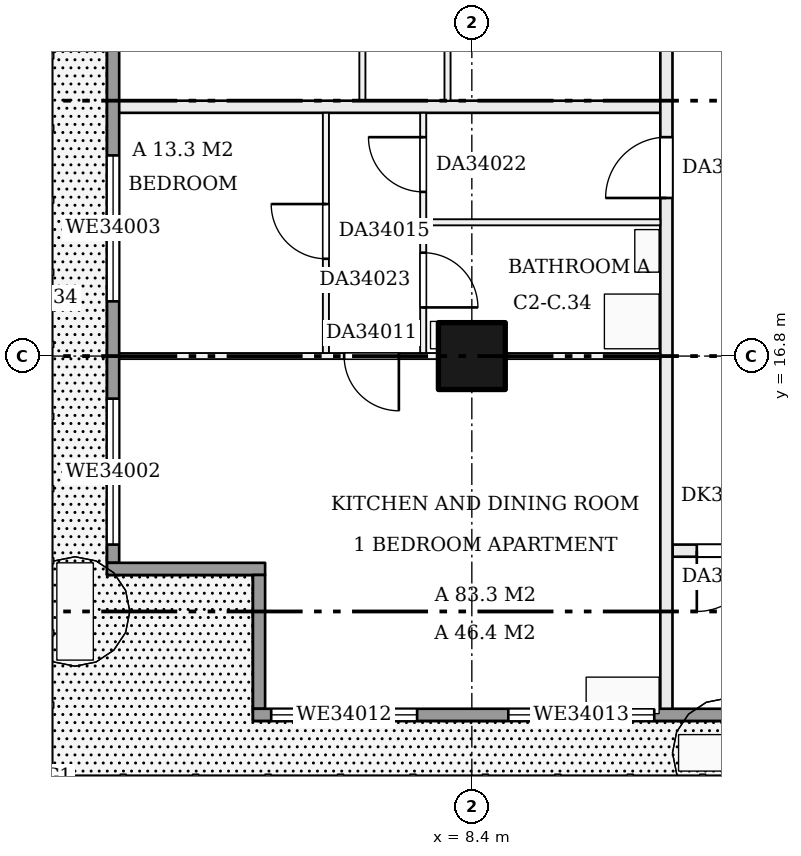
"""IFC4 building model, lengths in metres.
Left out: names, types, materials, properties, quantities, classifications, styles, units other than length and angle.
Written with IfcOpenShell. Run it as: python <this file> out.ifc"""

import sys

from ifc_helpers import new_model, si_unit, direction, frame, frame_2d, origin, origin_2d, place, context, subcontext, project, spatial, rectangle, extrude, element, fill, save


model = new_model("IFC4")
c1 = context("Model", 3, precision=1e-05, world=origin(), true_north=direction((0.0, 1.0)))
c2 = subcontext(c1, "Body", "Model", "MODEL_VIEW")
j1 = project(units=[si_unit("LENGTHUNIT", "METRE"), si_unit("PLANEANGLEUNIT", "RADIAN")], contexts=[c1])
p1 = place(None, origin())
s1 = spatial("IfcSite", under=j1, at=p1, CompositionType="ELEMENT")
p2 = place(p1, origin())
s2 = spatial("IfcBuilding", under=s1, at=p2, CompositionType="ELEMENT")
p3 = place(p2, frame((0.0, 0.0, 133.7)))
s3 = spatial("IfcBuildingStorey", under=s2, at=p3, CompositionType="ELEMENT", Elevation=133.7)
p4 = place(p3, frame((8.4, 16.8, 0.0), z_axis=(0.0, 0.0, 1.0), x_axis=(1.0, 0.0, 0.0)))
e1 = element("IfcColumn", 1, at=p4, inside=s3, PredefinedType="COLUMN", context=c2, shape_type="SweptSolid", body=[
    extrude(rectangle(XDim=1.1, YDim=1.1, at=origin_2d()), origin(), (0.0, 0.0, 1.0), 3.22),
])
p5 = place(p3, frame((11.7, 13.6, 0.0), z_axis=(0.0, 0.0, 1.0), x_axis=(1.0, 0.0, 0.0)))
e2 = element("IfcWall", 2, at=p5, inside=s3, PredefinedType="PARTITIONING", context=c2, shape_type="SweptSolid", body=[
    extrude(rectangle(XDim=1.8, YDim=0.2, at=frame_2d((0.9, 0.0))), origin(), (0.0, 0.0, 1.0), 3.22),
])
p6 = place(p5, frame((0.4, 0.0, 0.0)))
e3 = element("IfcOpeningElement", 3, at=p6, cuts=e2, PredefinedType="OPENING", context=c2, shape_type="SweptSolid", body=[
    extrude(rectangle(XDim=1.0, YDim=2.1, at=frame_2d((0.5, 1.05))), frame((0.0, 0.11, 0.0), z_axis=(0.0, -1.0, 0.0), x_axis=(1.0, 0.0, 0.0)), (0.0, 0.0, 1.0), 0.22),
])
p7 = place(p3, frame((2.5, 16.8, 0.0), z_axis=(0.0, 0.0, 1.0), x_axis=(1.0, 0.0, 0.0)))
e4 = element("IfcWall", 4, at=p7, inside=s3, PredefinedType="PARTITIONING", context=c2, shape_type="SweptSolid", body=[
    extrude(rectangle(XDim=9.0, YDim=0.1, at=frame_2d((4.5, 0.0))), origin(), (0.0, 0.0, 1.0), 3.22),
])
p8 = place(p7, frame((3.8, 0.0, 0.0)))
e5 = element("IfcOpeningElement", 5, at=p8, cuts=e4, PredefinedType="OPENING", context=c2, shape_type="SweptSolid", body=[
    extrude(rectangle(XDim=0.9, YDim=2.1, at=frame_2d((0.45, 1.05))), frame((0.0, 0.06, 0.0), z_axis=(0.0, -1.0, 0.0), x_axis=(1.0, 0.0, 0.0)), (0.0, 0.0, 1.0), 0.12),
])
p9 = place(p3, frame((7.65, 19.0, 0.0), z_axis=(0.0, 0.0, 1.0), x_axis=(1.0, 0.0, 0.0)))
e6 = element("IfcWall", 6, at=p9, inside=s3, PredefinedType="PARTITIONING", context=c2, shape_type="SweptSolid", body=[
    extrude(rectangle(XDim=3.85, YDim=0.1, at=frame_2d((1.925, 0.0))), origin(), (0.0, 0.0, 1.0), 3.22),
])
p10 = place(p3, frame((2.5, 20.9, 0.0), z_axis=(0.0, 0.0, 1.0), x_axis=(1.0, 0.0, 0.0)))
e7 = element("IfcWall", 7, at=p10, inside=s3, PredefinedType="PARTITIONING", context=c2, shape_type="SweptSolid", body=[
    extrude(rectangle(XDim=9.0, YDim=0.2, at=frame_2d((4.5, 0.0))), origin(), (0.0, 0.0, 1.0), 3.22),
])
p11 = place(p3, frame((6.0, 16.85, 0.0), z_axis=(0.0, 0.0, 1.0), x_axis=(0.0, 1.0, 0.0)))
e8 = element("IfcWall", 8, at=p11, inside=s3, PredefinedType="PARTITIONING", context=c2, shape_type="SweptSolid", body=[
    extrude(rectangle(XDim=3.95, YDim=0.1, at=frame_2d((1.975, 0.0))), origin(), (0.0, 0.0, 1.0), 3.22),
])
p12 = place(p11, frame((1.55, 0.0, 0.0)))
e9 = element("IfcOpeningElement", 9, at=p12, cuts=e8, PredefinedType="OPENING", context=c2, shape_type="SweptSolid", body=[
    extrude(rectangle(XDim=0.9, YDim=2.1, at=frame_2d((0.45, 1.05))), frame((0.0, 0.06, 0.0), z_axis=(0.0, -1.0, 0.0), x_axis=(1.0, 0.0, 0.0)), (0.0, 0.0, 1.0), 0.12),
])
p13 = place(p3, frame((6.6, 21.0, 0.0), z_axis=(0.0, 0.0, 1.0), x_axis=(0.0, 1.0, 0.0)))
e10 = element("IfcWall", 10, at=p13, inside=s3, PredefinedType="PARTITIONING", context=c2, shape_type="SweptSolid", body=[
    extrude(rectangle(XDim=20.9, YDim=0.1, at=frame_2d((10.45, 0.0))), origin(), (0.0, 0.0, 1.0), 3.22),
])
p14 = place(p13, frame((5.8, 0.0, 0.0)))
e11 = element("IfcOpeningElement", 11, at=p14, cuts=e10, PredefinedType="OPENING", context=c2, shape_type="SweptSolid", body=[
    extrude(rectangle(XDim=0.9, YDim=2.1, at=frame_2d((0.45, 1.05))), frame((0.0, 0.06, 0.0), z_axis=(0.0, -1.0, 0.0), x_axis=(1.0, 0.0, 0.0)), (0.0, 0.0, 1.0), 0.12),
])
p15 = place(p13, frame((14.2, 0.0, 0.0)))
e12 = element("IfcOpeningElement", 12, at=p15, cuts=e10, PredefinedType="OPENING", context=c2, shape_type="SweptSolid", body=[
    extrude(rectangle(XDim=0.9, YDim=2.1, at=frame_2d((0.45, 1.05))), frame((0.0, 0.06, 0.0), z_axis=(0.0, -1.0, 0.0), x_axis=(1.0, 0.0, 0.0)), (0.0, 0.0, 1.0), 0.12),
])
p16 = place(p13, frame((18.4, 0.0, 0.0)))
e13 = element("IfcOpeningElement", 13, at=p16, cuts=e10, PredefinedType="OPENING", context=c2, shape_type="SweptSolid", body=[
    extrude(rectangle(XDim=0.9, YDim=2.1, at=frame_2d((0.45, 1.05))), frame((0.0, 0.06, 0.0), z_axis=(0.0, -1.0, 0.0), x_axis=(1.0, 0.0, 0.0)), (0.0, 0.0, 1.0), 0.12),
])
p17 = place(p3, frame((7.6, 16.85, 0.0), z_axis=(0.0, 0.0, 1.0), x_axis=(0.0, 1.0, 0.0)))
e14 = element("IfcWall", 14, at=p17, inside=s3, PredefinedType="PARTITIONING", context=c2, shape_type="SweptSolid", body=[
    extrude(rectangle(XDim=3.95, YDim=0.1, at=frame_2d((1.975, 0.0))), origin(), (0.0, 0.0, 1.0), 3.22),
])
p18 = place(p17, frame((2.65, 0.0, 0.0)))
e15 = element("IfcOpeningElement", 15, at=p18, cuts=e14, PredefinedType="OPENING", context=c2, shape_type="SweptSolid", body=[
    extrude(rectangle(XDim=0.9, YDim=2.1, at=frame_2d((0.45, 1.05))), frame((0.0, 0.06, 0.0), z_axis=(0.0, -1.0, 0.0), x_axis=(1.0, 0.0, 0.0)), (0.0, 0.0, 1.0), 0.12),
])
p19 = place(p17, frame((0.75, 0.0, 0.0)))
e16 = element("IfcOpeningElement", 16, at=p19, cuts=e14, PredefinedType="OPENING", context=c2, shape_type="SweptSolid", body=[
    extrude(rectangle(XDim=0.9, YDim=2.1, at=frame_2d((0.45, 1.05))), frame((0.0, 0.06, 0.0), z_axis=(0.0, -1.0, 0.0), x_axis=(1.0, 0.0, 0.0)), (0.0, 0.0, 1.0), 0.12),
])
p20 = place(p3, frame((8.0, 21.0, 0.0), z_axis=(0.0, 0.0, 1.0), x_axis=(0.0, 1.0, 0.0)))
e17 = element("IfcWall", 17, at=p20, inside=s3, PredefinedType="PARTITIONING", context=c2, shape_type="SweptSolid", body=[
    extrude(rectangle(XDim=20.9, YDim=0.1, at=frame_2d((10.45, 0.0))), origin(), (0.0, 0.0, 1.0), 3.22),
])
p21 = place(p20, frame((1.1, 0.0, 0.0)))
e18 = element("IfcOpeningElement", 18, at=p21, cuts=e17, PredefinedType="OPENING", context=c2, shape_type="SweptSolid", body=[
    extrude(rectangle(XDim=0.9, YDim=2.1, at=frame_2d((0.45, 1.05))), frame((0.0, 0.06, 0.0), z_axis=(0.0, -1.0, 0.0), x_axis=(1.0, 0.0, 0.0)), (0.0, 0.0, 1.0), 0.12),
])
p22 = place(p20, frame((4.95, 0.0, 0.0)))
e19 = element("IfcOpeningElement", 19, at=p22, cuts=e17, PredefinedType="OPENING", context=c2, shape_type="SweptSolid", body=[
    extrude(rectangle(XDim=0.9, YDim=2.1, at=frame_2d((0.45, 1.05))), frame((0.0, 0.06, 0.0), z_axis=(0.0, -1.0, 0.0), x_axis=(1.0, 0.0, 0.0)), (0.0, 0.0, 1.0), 0.12),
])
p23 = place(p20, frame((8.7, 0.0, 0.0)))
e20 = element("IfcOpeningElement", 20, at=p23, cuts=e17, PredefinedType="OPENING", context=c2, shape_type="SweptSolid", body=[
    extrude(rectangle(XDim=0.9, YDim=2.1, at=frame_2d((0.45, 1.05))), frame((0.0, 0.06, 0.0), z_axis=(0.0, -1.0, 0.0), x_axis=(1.0, 0.0, 0.0)), (0.0, 0.0, 1.0), 0.12),
])
p24 = place(p20, frame((13.35, 0.0, 0.0)))
e21 = element("IfcOpeningElement", 21, at=p24, cuts=e17, PredefinedType="OPENING", context=c2, shape_type="SweptSolid", body=[
    extrude(rectangle(XDim=0.9, YDim=2.1, at=frame_2d((0.45, 1.05))), frame((0.0, 0.06, 0.0), z_axis=(0.0, -1.0, 0.0), x_axis=(1.0, 0.0, 0.0)), (0.0, 0.0, 1.0), 0.12),
])
p25 = place(p20, frame((15.5, 0.0, 0.0)))
e22 = element("IfcOpeningElement", 22, at=p25, cuts=e17, PredefinedType="OPENING", context=c2, shape_type="SweptSolid", body=[
    extrude(rectangle(XDim=0.9, YDim=2.1, at=frame_2d((0.45, 1.05))), frame((0.0, 0.06, 0.0), z_axis=(0.0, -1.0, 0.0), x_axis=(1.0, 0.0, 0.0)), (0.0, 0.0, 1.0), 0.12),
])
p26 = place(p20, frame((18.75, 0.0, 0.0)))
e23 = element("IfcOpeningElement", 23, at=p26, cuts=e17, PredefinedType="OPENING", context=c2, shape_type="SweptSolid", body=[
    extrude(rectangle(XDim=0.9, YDim=2.1, at=frame_2d((0.45, 1.05))), frame((0.0, 0.06, 0.0), z_axis=(0.0, -1.0, 0.0), x_axis=(1.0, 0.0, 0.0)), (0.0, 0.0, 1.0), 0.12),
])
p27 = place(p3, frame((11.6, 10.9, 0.0), z_axis=(0.0, 0.0, 1.0), x_axis=(0.0, 1.0, 0.0)))
e24 = element("IfcWall", 24, at=p27, inside=s3, PredefinedType="PARTITIONING", context=c2, shape_type="SweptSolid", body=[
    extrude(rectangle(XDim=31.1, YDim=0.2, at=frame_2d((15.55, 0.0))), origin(), (0.0, 0.0, 1.0), 3.22),
])
p28 = place(p27, frame((8.5, 0.0, 0.0)))
e25 = element("IfcOpeningElement", 25, at=p28, cuts=e24, PredefinedType="OPENING", context=c2, shape_type="SweptSolid", body=[
    extrude(rectangle(XDim=1.0, YDim=2.1, at=frame_2d((0.5, 1.05))), frame((0.0, 0.11, 0.0), z_axis=(0.0, -1.0, 0.0), x_axis=(1.0, 0.0, 0.0)), (0.0, 0.0, 1.0), 0.22),
])
p29 = place(p27, frame((11.2, 0.0, 0.0)))
e26 = element("IfcOpeningElement", 26, at=p29, cuts=e24, PredefinedType="OPENING", context=c2, shape_type="SweptSolid", body=[
    extrude(rectangle(XDim=1.0, YDim=2.1, at=frame_2d((0.5, 1.05))), frame((0.0, 0.11, 0.0), z_axis=(0.0, -1.0, 0.0), x_axis=(1.0, 0.0, 0.0)), (0.0, 0.0, 1.0), 0.22),
])
p30 = place(p3, frame((2.5, 53.8, 0.0), z_axis=(0.0, 0.0, 1.0), x_axis=(0.0, -1.0, 0.0)))
e27 = element("IfcWall", 27, at=p30, inside=s3, PredefinedType="SOLIDWALL", context=c2, shape_type="SweptSolid", body=[
    extrude(rectangle(XDim=40.4, YDim=0.2, at=frame_2d((20.2, 0.0))), origin(), (0.0, 0.0, 1.0), 3.22),
])
p31 = place(p30, frame((37.7, 0.0, 0.9)))
e28 = element("IfcOpeningElement", 28, at=p31, cuts=e27, PredefinedType="OPENING", context=c2, shape_type="SweptSolid", body=[
    extrude(rectangle(XDim=2.4, YDim=1.5, at=frame_2d((1.2, 0.75))), frame((0.0, 0.11, 0.0), z_axis=(0.0, -1.0, 0.0), x_axis=(1.0, 0.0, 0.0)), (0.0, 0.0, 1.0), 0.22),
])
p32 = place(p30, frame((33.7, 0.0, 0.9)))
e29 = element("IfcOpeningElement", 29, at=p32, cuts=e27, PredefinedType="OPENING", context=c2, shape_type="SweptSolid", body=[
    extrude(rectangle(XDim=2.4, YDim=1.5, at=frame_2d((1.2, 0.75))), frame((0.0, 0.11, 0.0), z_axis=(0.0, -1.0, 0.0), x_axis=(1.0, 0.0, 0.0)), (0.0, 0.0, 1.0), 0.22),
])
p33 = place(p30, frame((29.5, 0.0, 0.0)))
e30 = element("IfcOpeningElement", 30, at=p33, cuts=e27, PredefinedType="OPENING", context=c2, shape_type="SweptSolid", body=[
    extrude(rectangle(XDim=2.4, YDim=2.2, at=frame_2d((1.2, 1.1))), frame((0.0, 0.11, 0.0), z_axis=(0.0, -1.0, 0.0), x_axis=(1.0, 0.0, 0.0)), (0.0, 0.0, 1.0), 0.22),
])
p34 = place(p30, frame((25.3, 0.0, 0.0)))
e31 = element("IfcOpeningElement", 31, at=p34, cuts=e27, PredefinedType="OPENING", context=c2, shape_type="SweptSolid", body=[
    extrude(rectangle(XDim=2.4, YDim=2.2, at=frame_2d((1.2, 1.1))), frame((0.0, 0.11, 0.0), z_axis=(0.0, -1.0, 0.0), x_axis=(1.0, 0.0, 0.0)), (0.0, 0.0, 1.0), 0.22),
])
p35 = place(p30, frame((21.1, 0.0, 0.0)))
e32 = element("IfcOpeningElement", 32, at=p35, cuts=e27, PredefinedType="OPENING", context=c2, shape_type="SweptSolid", body=[
    extrude(rectangle(XDim=2.4, YDim=2.2, at=frame_2d((1.2, 1.1))), frame((0.0, 0.11, 0.0), z_axis=(0.0, -1.0, 0.0), x_axis=(1.0, 0.0, 0.0)), (0.0, 0.0, 1.0), 0.22),
])
p36 = place(p30, frame((16.9, 0.0, 0.9)))
e33 = element("IfcOpeningElement", 33, at=p36, cuts=e27, PredefinedType="OPENING", context=c2, shape_type="SweptSolid", body=[
    extrude(rectangle(XDim=2.4, YDim=1.5, at=frame_2d((1.2, 0.75))), frame((0.0, 0.11, 0.0), z_axis=(0.0, -1.0, 0.0), x_axis=(1.0, 0.0, 0.0)), (0.0, 0.0, 1.0), 0.22),
])
p37 = place(p30, frame((12.7, 0.0, 0.9)))
e34 = element("IfcOpeningElement", 34, at=p37, cuts=e27, PredefinedType="OPENING", context=c2, shape_type="SweptSolid", body=[
    extrude(rectangle(XDim=2.4, YDim=1.5, at=frame_2d((1.2, 0.75))), frame((0.0, 0.11, 0.0), z_axis=(0.0, -1.0, 0.0), x_axis=(1.0, 0.0, 0.0)), (0.0, 0.0, 1.0), 0.22),
])
p38 = place(p30, frame((8.5, 0.0, 0.9)))
e35 = element("IfcOpeningElement", 35, at=p38, cuts=e27, PredefinedType="OPENING", context=c2, shape_type="SweptSolid", body=[
    extrude(rectangle(XDim=2.4, YDim=1.5, at=frame_2d((1.2, 0.75))), frame((0.0, 0.11, 0.0), z_axis=(0.0, -1.0, 0.0), x_axis=(1.0, 0.0, 0.0)), (0.0, 0.0, 1.0), 0.22),
])
p39 = place(p30, frame((4.3, 0.0, 0.9)))
e36 = element("IfcOpeningElement", 36, at=p39, cuts=e27, PredefinedType="OPENING", context=c2, shape_type="SweptSolid", body=[
    extrude(rectangle(XDim=2.4, YDim=1.5, at=frame_2d((1.2, 0.75))), frame((0.0, 0.11, 0.0), z_axis=(0.0, -1.0, 0.0), x_axis=(1.0, 0.0, 0.0)), (0.0, 0.0, 1.0), 0.22),
])
p40 = place(p30, frame((0.3, 0.0, 0.9)))
e37 = element("IfcOpeningElement", 37, at=p40, cuts=e27, PredefinedType="OPENING", context=c2, shape_type="SweptSolid", body=[
    extrude(rectangle(XDim=2.4, YDim=1.5, at=frame_2d((1.2, 0.75))), frame((0.0, 0.11, 0.0), z_axis=(0.0, -1.0, 0.0), x_axis=(1.0, 0.0, 0.0)), (0.0, 0.0, 1.0), 0.22),
])
p41 = place(p3, frame((2.4, 13.3, 0.0), z_axis=(0.0, 0.0, 1.0), x_axis=(1.0, 0.0, 0.0)))
e38 = element("IfcWall", 38, at=p41, inside=s3, PredefinedType="SOLIDWALL", context=c2, shape_type="SweptSolid", body=[
    extrude(rectangle(XDim=2.6, YDim=0.2, at=frame_2d((1.3, 0.0))), origin(), (0.0, 0.0, 1.0), 3.22),
])
p42 = place(p3, frame((4.9, 13.2, 0.0), z_axis=(0.0, 0.0, 1.0), x_axis=(0.0, -1.0, 0.0)))
e39 = element("IfcWall", 39, at=p42, inside=s3, PredefinedType="SOLIDWALL", context=c2, shape_type="SweptSolid", body=[
    extrude(rectangle(XDim=2.2, YDim=0.2, at=frame_2d((1.1, 0.0))), origin(), (0.0, 0.0, 1.0), 3.22),
])
p43 = place(p3, frame((4.8, 10.9, 0.0), z_axis=(0.0, 0.0, 1.0), x_axis=(1.0, 0.0, 0.0)))
e40 = element("IfcWall", 40, at=p43, inside=s3, PredefinedType="SOLIDWALL", context=c2, shape_type="SweptSolid", body=[
    extrude(rectangle(XDim=37.2, YDim=0.2, at=frame_2d((18.6, 0.0))), origin(), (0.0, 0.0, 1.0), 3.22),
])
p44 = place(p43, frame((0.3, 0.0, 0.9)))
e41 = element("IfcOpeningElement", 41, at=p44, cuts=e40, PredefinedType="OPENING", context=c2, shape_type="SweptSolid", body=[
    extrude(rectangle(XDim=2.4, YDim=1.5, at=frame_2d((1.2, 0.75))), frame((0.0, 0.11, 0.0), z_axis=(0.0, -1.0, 0.0), x_axis=(1.0, 0.0, 0.0)), (0.0, 0.0, 1.0), 0.22),
])
p45 = place(p43, frame((4.2, 0.0, 0.9)))
e42 = element("IfcOpeningElement", 42, at=p45, cuts=e40, PredefinedType="OPENING", context=c2, shape_type="SweptSolid", body=[
    extrude(rectangle(XDim=2.4, YDim=1.5, at=frame_2d((1.2, 0.75))), frame((0.0, 0.11, 0.0), z_axis=(0.0, -1.0, 0.0), x_axis=(1.0, 0.0, 0.0)), (0.0, 0.0, 1.0), 0.22),
])
p46 = place(p43, frame((12.9, 0.0, 0.0)))
e43 = element("IfcOpeningElement", 43, at=p46, cuts=e40, PredefinedType="OPENING", context=c2, shape_type="SweptSolid", body=[
    extrude(rectangle(XDim=2.4, YDim=2.2, at=frame_2d((1.2, 1.1))), frame((0.0, 0.11, 0.0), z_axis=(0.0, -1.0, 0.0), x_axis=(1.0, 0.0, 0.0)), (0.0, 0.0, 1.0), 0.22),
])
p47 = place(p43, frame((17.1, 0.0, 0.0)))
e44 = element("IfcOpeningElement", 44, at=p47, cuts=e40, PredefinedType="OPENING", context=c2, shape_type="SweptSolid", body=[
    extrude(rectangle(XDim=2.4, YDim=2.2, at=frame_2d((1.2, 1.1))), frame((0.0, 0.11, 0.0), z_axis=(0.0, -1.0, 0.0), x_axis=(1.0, 0.0, 0.0)), (0.0, 0.0, 1.0), 0.22),
])
p48 = place(p43, frame((21.3, 0.0, 0.0)))
e45 = element("IfcOpeningElement", 45, at=p48, cuts=e40, PredefinedType="OPENING", context=c2, shape_type="SweptSolid", body=[
    extrude(rectangle(XDim=2.4, YDim=2.2, at=frame_2d((1.2, 1.1))), frame((0.0, 0.11, 0.0), z_axis=(0.0, -1.0, 0.0), x_axis=(1.0, 0.0, 0.0)), (0.0, 0.0, 1.0), 0.22),
])
p49 = place(p43, frame((25.5, 0.0, 0.9)))
e46 = element("IfcOpeningElement", 46, at=p49, cuts=e40, PredefinedType="OPENING", context=c2, shape_type="SweptSolid", body=[
    extrude(rectangle(XDim=2.4, YDim=1.5, at=frame_2d((1.2, 0.75))), frame((0.0, 0.11, 0.0), z_axis=(0.0, -1.0, 0.0), x_axis=(1.0, 0.0, 0.0)), (0.0, 0.0, 1.0), 0.22),
])
p50 = place(p43, frame((29.7, 0.0, 0.9)))
e47 = element("IfcOpeningElement", 47, at=p50, cuts=e40, PredefinedType="OPENING", context=c2, shape_type="SweptSolid", body=[
    extrude(rectangle(XDim=2.4, YDim=1.5, at=frame_2d((1.2, 0.75))), frame((0.0, 0.11, 0.0), z_axis=(0.0, -1.0, 0.0), x_axis=(1.0, 0.0, 0.0)), (0.0, 0.0, 1.0), 0.22),
])
p51 = place(p43, frame((33.9, 0.0, 0.9)))
e48 = element("IfcOpeningElement", 48, at=p51, cuts=e40, PredefinedType="OPENING", context=c2, shape_type="SweptSolid", body=[
    extrude(rectangle(XDim=1.3, YDim=1.5, at=frame_2d((0.65, 0.75))), frame((0.0, 0.11, 0.0), z_axis=(0.0, -1.0, 0.0), x_axis=(1.0, 0.0, 0.0)), (0.0, 0.0, 1.0), 0.22),
])
p52 = place(p6, frame((1.0, 0.0, 0.0), z_axis=(0.0, 0.0, 1.0), x_axis=(-1.0, 0.0, 0.0)))
e49 = element("IfcDoor", 49, at=p52, inside=s3, OperationType="SINGLE_SWING_RIGHT", PredefinedType="DOOR", context=c2, shape_type="SweptSolid", body=[
    extrude(rectangle(XDim=1.0, YDim=2.1, at=frame_2d((0.5, 1.05))), frame((0.0, 0.025, 0.0), z_axis=(0.0, -1.0, 0.0), x_axis=(1.0, 0.0, 0.0)), (0.0, 0.0, 1.0), 0.05),
])
fill(e3, e49)
p53 = place(p8, frame((0.9, 0.0, 0.0), z_axis=(0.0, 0.0, 1.0), x_axis=(-1.0, 0.0, 0.0)))
e50 = element("IfcDoor", 50, at=p53, inside=s3, OperationType="SINGLE_SWING_LEFT", PredefinedType="DOOR", context=c2, shape_type="SweptSolid", body=[
    extrude(rectangle(XDim=0.9, YDim=2.1, at=frame_2d((0.45, 1.05))), frame((0.0, 0.025, 0.0), z_axis=(0.0, -1.0, 0.0), x_axis=(1.0, 0.0, 0.0)), (0.0, 0.0, 1.0), 0.05),
])
fill(e5, e50)
p54 = place(p12, origin())
e51 = element("IfcDoor", 51, at=p54, inside=s3, OperationType="SINGLE_SWING_RIGHT", PredefinedType="DOOR", context=c2, shape_type="SweptSolid", body=[
    extrude(rectangle(XDim=0.9, YDim=2.1, at=frame_2d((0.45, 1.05))), frame((0.0, 0.025, 0.0), z_axis=(0.0, -1.0, 0.0), x_axis=(1.0, 0.0, 0.0)), (0.0, 0.0, 1.0), 0.05),
])
fill(e9, e51)
p55 = place(p18, origin())
e52 = element("IfcDoor", 52, at=p55, inside=s3, OperationType="SINGLE_SWING_RIGHT", PredefinedType="DOOR", context=c2, shape_type="SweptSolid", body=[
    extrude(rectangle(XDim=0.9, YDim=2.1, at=frame_2d((0.45, 1.05))), frame((0.0, 0.025, 0.0), z_axis=(0.0, -1.0, 0.0), x_axis=(1.0, 0.0, 0.0)), (0.0, 0.0, 1.0), 0.05),
])
fill(e15, e52)
p56 = place(p19, frame((0.9, 0.0, 0.0), z_axis=(0.0, 0.0, 1.0), x_axis=(-1.0, 0.0, 0.0)))
e53 = element("IfcDoor", 53, at=p56, inside=s3, OperationType="SINGLE_SWING_RIGHT", PredefinedType="DOOR", context=c2, shape_type="SweptSolid", body=[
    extrude(rectangle(XDim=0.9, YDim=2.1, at=frame_2d((0.45, 1.05))), frame((0.0, 0.025, 0.0), z_axis=(0.0, -1.0, 0.0), x_axis=(1.0, 0.0, 0.0)), (0.0, 0.0, 1.0), 0.05),
])
fill(e16, e53)
p57 = place(p28, origin())
e54 = element("IfcDoor", 54, at=p57, inside=s3, OperationType="SINGLE_SWING_LEFT", PredefinedType="DOOR", context=c2, shape_type="SweptSolid", body=[
    extrude(rectangle(XDim=1.0, YDim=2.1, at=frame_2d((0.5, 1.05))), frame((0.0, 0.025, 0.0), z_axis=(0.0, -1.0, 0.0), x_axis=(1.0, 0.0, 0.0)), (0.0, 0.0, 1.0), 0.05),
])
fill(e25, e54)
p58 = place(p31, origin())
e55 = element("IfcWindow", 55, at=p58, inside=s3, PartitioningType="SINGLE_PANEL", PredefinedType="WINDOW", context=c2, shape_type="SweptSolid", body=[
    extrude(rectangle(XDim=2.4, YDim=1.5, at=frame_2d((1.2, 0.75))), frame((0.0, 0.03, 0.0), z_axis=(0.0, -1.0, 0.0), x_axis=(1.0, 0.0, 0.0)), (0.0, 0.0, 1.0), 0.06),
])
fill(e28, e55)
p59 = place(p32, origin())
e56 = element("IfcWindow", 56, at=p59, inside=s3, PartitioningType="SINGLE_PANEL", PredefinedType="WINDOW", context=c2, shape_type="SweptSolid", body=[
    extrude(rectangle(XDim=2.4, YDim=1.5, at=frame_2d((1.2, 0.75))), frame((0.0, 0.03, 0.0), z_axis=(0.0, -1.0, 0.0), x_axis=(1.0, 0.0, 0.0)), (0.0, 0.0, 1.0), 0.06),
])
fill(e29, e56)
p60 = place(p44, origin())
e57 = element("IfcWindow", 57, at=p60, inside=s3, PartitioningType="SINGLE_PANEL", PredefinedType="WINDOW", context=c2, shape_type="SweptSolid", body=[
    extrude(rectangle(XDim=2.4, YDim=1.5, at=frame_2d((1.2, 0.75))), frame((0.0, 0.03, 0.0), z_axis=(0.0, -1.0, 0.0), x_axis=(1.0, 0.0, 0.0)), (0.0, 0.0, 1.0), 0.06),
])
fill(e41, e57)
p61 = place(p45, origin())
e58 = element("IfcWindow", 58, at=p61, inside=s3, PartitioningType="SINGLE_PANEL", PredefinedType="WINDOW", context=c2, shape_type="SweptSolid", body=[
    extrude(rectangle(XDim=2.4, YDim=1.5, at=frame_2d((1.2, 0.75))), frame((0.0, 0.03, 0.0), z_axis=(0.0, -1.0, 0.0), x_axis=(1.0, 0.0, 0.0)), (0.0, 0.0, 1.0), 0.06),
])
fill(e42, e58)
save(model, sys.argv[1])
